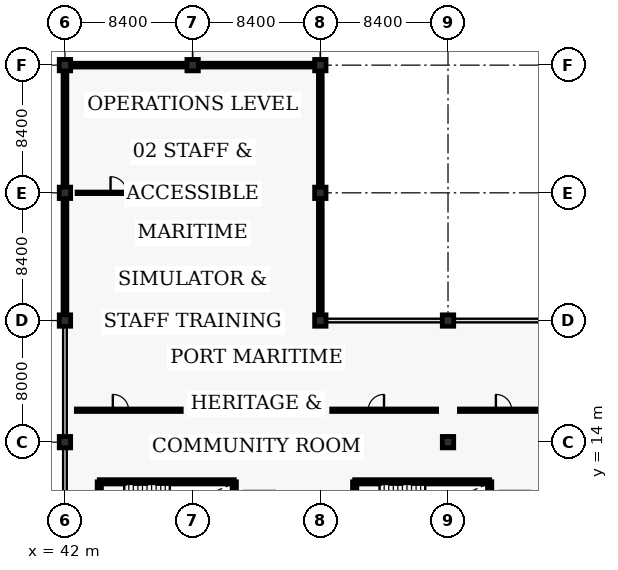
"""IFC4 building model, lengths in metres.
Left out: names, types, materials, properties, quantities, classifications, styles, units other than length and angle.
Written with IfcOpenShell. Run it as: python <this file> out.ifc"""

import sys

from ifc_helpers import new_model, si_unit, direction, frame, frame_2d, origin, origin_2d, place, context, subcontext, project, spatial, rectangle, extrude, element, fill, save


model = new_model("IFC4")
c1 = context("Model", 3, precision=1e-05, world=origin(), true_north=direction((0.0, 1.0)))
c2 = subcontext(c1, "Body", "Model", "MODEL_VIEW")
j1 = project(units=[si_unit("LENGTHUNIT", "METRE"), si_unit("PLANEANGLEUNIT", "RADIAN")], contexts=[c1])
p1 = place(None, origin())
s1 = spatial("IfcSite", under=j1, at=p1, CompositionType="ELEMENT")
p2 = place(p1, origin())
s2 = spatial("IfcBuilding", under=s1, at=p2, CompositionType="ELEMENT")
p3 = place(p2, frame((0.0, 0.0, 9.6)))
s3 = spatial("IfcBuildingStorey", under=s2, at=p3, CompositionType="ELEMENT", Elevation=9.6)
for number, where, z_axis, x_axis in (
    (1, (42.0, 14.0, 0.0), (0.0, 0.0, 1.0), (1.0, 0.0, 0.0)),
    (2, (42.0, 22.0, 0.0), (0.0, 0.0, 1.0), (1.0, 0.0, 0.0)),
    (3, (50.4, 14.0, 0.0), (0.0, 0.0, 1.0), (1.0, 0.0, 0.0)),
    (4, (50.4, 22.0, 0.0), (0.0, 0.0, 1.0), (1.0, 0.0, 0.0)),
    (5, (58.8, 14.0, 0.0), (0.0, 0.0, 1.0), (1.0, 0.0, 0.0)),
    (6, (58.8, 22.0, 0.0), (0.0, 0.0, 1.0), (1.0, 0.0, 0.0)),
    (7, (67.2, 14.0, 0.0), (0.0, 0.0, 1.0), (1.0, 0.0, 0.0)),
    (8, (67.2, 22.0, 0.0), (0.0, 0.0, 1.0), (1.0, 0.0, 0.0)),
    (9, (42.0, 30.4, 0.0), (0.0, 0.0, 1.0), (1.0, 0.0, 0.0)),
    (10, (42.0, 38.8, 0.0), (0.0, 0.0, 1.0), (1.0, 0.0, 0.0)),
    (11, (50.4, 30.4, 0.0), (0.0, 0.0, 1.0), (1.0, 0.0, 0.0)),
    (12, (50.4, 38.8, 0.0), (0.0, 0.0, 1.0), (1.0, 0.0, 0.0)),
    (13, (58.8, 30.4, 0.0), (0.0, 0.0, 1.0), (1.0, 0.0, 0.0)),
    (14, (58.8, 38.8, 0.0), (0.0, 0.0, 1.0), (1.0, 0.0, 0.0)),
):
    element("IfcColumn", number, at=place(p3, frame(where, z_axis=z_axis, x_axis=x_axis)), inside=s3, PredefinedType="COLUMN", context=c2, shape_type="SweptSolid", body=[
        extrude(rectangle(XDim=0.75, YDim=0.75, at=origin_2d()), origin(), (0.0, 0.0, 1.0), 3.52),
    ])
p4 = place(p3, frame((42.0, 30.025, 0.0), z_axis=(0.0, 0.0, 1.0), x_axis=(0.0, -1.0, 0.0)))
e15 = element("IfcWall", 15, at=p4, inside=s3, PredefinedType="SOLIDWALL", context=c2, shape_type="SweptSolid", body=[
    extrude(rectangle(XDim=7.65, YDim=0.25, at=frame_2d((3.825, 0.0))), origin(), (0.0, 0.0, 1.0), 2.805),
])
p5 = place(p4, frame((1.665, 0.0, 0.95)))
e16 = element("IfcOpeningElement", 16, at=p5, cuts=e15, PredefinedType="OPENING", context=c2, shape_type="SweptSolid", body=[
    extrude(rectangle(XDim=1.6, YDim=1.35, at=frame_2d((0.8, 0.675))), frame((0.0, 0.135, 0.0), z_axis=(0.0, -1.0, 0.0), x_axis=(1.0, 0.0, 0.0)), (0.0, 0.0, 1.0), 0.27),
])
p6 = place(p4, frame((4.365, 0.0, 0.95)))
e17 = element("IfcOpeningElement", 17, at=p6, cuts=e15, PredefinedType="OPENING", context=c2, shape_type="SweptSolid", body=[
    extrude(rectangle(XDim=1.3, YDim=1.35, at=frame_2d((0.65, 0.675))), frame((0.0, 0.135, 0.0), z_axis=(0.0, -1.0, 0.0), x_axis=(1.0, 0.0, 0.0)), (0.0, 0.0, 1.0), 0.27),
])
p7 = place(p3, frame((58.8, 22.375, 0.0), z_axis=(0.0, 0.0, 1.0), x_axis=(0.0, 1.0, 0.0)))
e18 = element("IfcWall", 18, at=p7, inside=s3, PredefinedType="SOLIDWALL", context=c2, shape_type="SweptSolid", body=[
    extrude(rectangle(XDim=7.65, YDim=0.25, at=frame_2d((3.825, 0.0))), origin(), (0.0, 0.0, 1.0), 2.805),
])
p8 = place(p7, frame((1.665, 0.0, 0.95)))
e19 = element("IfcOpeningElement", 19, at=p8, cuts=e18, PredefinedType="OPENING", context=c2, shape_type="SweptSolid", body=[
    extrude(rectangle(XDim=1.6, YDim=1.35, at=frame_2d((0.8, 0.675))), frame((0.0, 0.135, 0.0), z_axis=(0.0, -1.0, 0.0), x_axis=(1.0, 0.0, 0.0)), (0.0, 0.0, 1.0), 0.27),
])
p9 = place(p7, frame((4.365, 0.0, 0.95)))
e20 = element("IfcOpeningElement", 20, at=p9, cuts=e18, PredefinedType="OPENING", context=c2, shape_type="SweptSolid", body=[
    extrude(rectangle(XDim=1.3, YDim=1.35, at=frame_2d((0.65, 0.675))), frame((0.0, 0.135, 0.0), z_axis=(0.0, -1.0, 0.0), x_axis=(1.0, 0.0, 0.0)), (0.0, 0.0, 1.0), 0.27),
])
p10 = place(p3, frame((42.0, 38.425, 0.0), z_axis=(0.0, 0.0, 1.0), x_axis=(0.0, -1.0, 0.0)))
e21 = element("IfcWall", 21, at=p10, inside=s3, PredefinedType="SOLIDWALL", context=c2, shape_type="SweptSolid", body=[
    extrude(rectangle(XDim=7.65, YDim=0.25, at=frame_2d((3.825, 0.0))), origin(), (0.0, 0.0, 1.0), 2.805),
])
p11 = place(p10, frame((1.665, 0.0, 0.95)))
e22 = element("IfcOpeningElement", 22, at=p11, cuts=e21, PredefinedType="OPENING", context=c2, shape_type="SweptSolid", body=[
    extrude(rectangle(XDim=1.6, YDim=1.35, at=frame_2d((0.8, 0.675))), frame((0.0, 0.135, 0.0), z_axis=(0.0, -1.0, 0.0), x_axis=(1.0, 0.0, 0.0)), (0.0, 0.0, 1.0), 0.27),
])
p12 = place(p10, frame((4.365, 0.0, 0.95)))
e23 = element("IfcOpeningElement", 23, at=p12, cuts=e21, PredefinedType="OPENING", context=c2, shape_type="SweptSolid", body=[
    extrude(rectangle(XDim=1.3, YDim=1.35, at=frame_2d((0.65, 0.675))), frame((0.0, 0.135, 0.0), z_axis=(0.0, -1.0, 0.0), x_axis=(1.0, 0.0, 0.0)), (0.0, 0.0, 1.0), 0.27),
])
p13 = place(p3, frame((58.8, 30.775, 0.0), z_axis=(0.0, 0.0, 1.0), x_axis=(0.0, 1.0, 0.0)))
e24 = element("IfcWall", 24, at=p13, inside=s3, PredefinedType="SOLIDWALL", context=c2, shape_type="SweptSolid", body=[
    extrude(rectangle(XDim=7.65, YDim=0.25, at=frame_2d((3.825, 0.0))), origin(), (0.0, 0.0, 1.0), 2.805),
])
p14 = place(p13, frame((1.665, 0.0, 0.95)))
e25 = element("IfcOpeningElement", 25, at=p14, cuts=e24, PredefinedType="OPENING", context=c2, shape_type="SweptSolid", body=[
    extrude(rectangle(XDim=1.6, YDim=1.35, at=frame_2d((0.8, 0.675))), frame((0.0, 0.135, 0.0), z_axis=(0.0, -1.0, 0.0), x_axis=(1.0, 0.0, 0.0)), (0.0, 0.0, 1.0), 0.27),
])
p15 = place(p13, frame((4.365, 0.0, 0.95)))
e26 = element("IfcOpeningElement", 26, at=p15, cuts=e24, PredefinedType="OPENING", context=c2, shape_type="SweptSolid", body=[
    extrude(rectangle(XDim=1.3, YDim=1.35, at=frame_2d((0.65, 0.675))), frame((0.0, 0.135, 0.0), z_axis=(0.0, -1.0, 0.0), x_axis=(1.0, 0.0, 0.0)), (0.0, 0.0, 1.0), 0.27),
])
p16 = place(p3, frame((50.025, 38.8, 0.0), z_axis=(0.0, 0.0, 1.0), x_axis=(-1.0, 0.0, 0.0)))
e27 = element("IfcWall", 27, at=p16, inside=s3, PredefinedType="SOLIDWALL", context=c2, shape_type="SweptSolid", body=[
    extrude(rectangle(XDim=7.65, YDim=0.25, at=frame_2d((3.825, 0.0))), origin(), (0.0, 0.0, 1.0), 2.805),
])
p17 = place(p16, frame((1.515, 0.0, 0.95)))
e28 = element("IfcOpeningElement", 28, at=p17, cuts=e27, PredefinedType="OPENING", context=c2, shape_type="SweptSolid", body=[
    extrude(rectangle(XDim=2.4, YDim=1.5, at=frame_2d((1.2, 0.75))), frame((0.0, 0.135, 0.0), z_axis=(0.0, -1.0, 0.0), x_axis=(1.0, 0.0, 0.0)), (0.0, 0.0, 1.0), 0.27),
])
p18 = place(p16, frame((4.315, 0.0, 1.35)))
e29 = element("IfcOpeningElement", 29, at=p18, cuts=e27, PredefinedType="OPENING", context=c2, shape_type="SweptSolid", body=[
    extrude(rectangle(XDim=2.8, YDim=1.05, at=frame_2d((1.4, 0.525))), frame((0.0, 0.135, 0.0), z_axis=(0.0, -1.0, 0.0), x_axis=(1.0, 0.0, 0.0)), (0.0, 0.0, 1.0), 0.27),
])
p19 = place(p3, frame((58.425, 38.8, 0.0), z_axis=(0.0, 0.0, 1.0), x_axis=(-1.0, 0.0, 0.0)))
e30 = element("IfcWall", 30, at=p19, inside=s3, PredefinedType="SOLIDWALL", context=c2, shape_type="SweptSolid", body=[
    extrude(rectangle(XDim=7.65, YDim=0.25, at=frame_2d((3.825, 0.0))), origin(), (0.0, 0.0, 1.0), 2.805),
])
p20 = place(p19, frame((1.515, 0.0, 0.95)))
e31 = element("IfcOpeningElement", 31, at=p20, cuts=e30, PredefinedType="OPENING", context=c2, shape_type="SweptSolid", body=[
    extrude(rectangle(XDim=2.4, YDim=1.5, at=frame_2d((1.2, 0.75))), frame((0.0, 0.135, 0.0), z_axis=(0.0, -1.0, 0.0), x_axis=(1.0, 0.0, 0.0)), (0.0, 0.0, 1.0), 0.27),
])
p21 = place(p19, frame((4.315, 0.0, 1.35)))
e32 = element("IfcOpeningElement", 32, at=p21, cuts=e30, PredefinedType="OPENING", context=c2, shape_type="SweptSolid", body=[
    extrude(rectangle(XDim=2.8, YDim=1.05, at=frame_2d((1.4, 0.525))), frame((0.0, 0.135, 0.0), z_axis=(0.0, -1.0, 0.0), x_axis=(1.0, 0.0, 0.0)), (0.0, 0.0, 1.0), 0.27),
])
p22 = place(p3, frame((44.26, 11.39, 0.0), z_axis=(0.0, 0.0, 1.0), x_axis=(1.0, 0.0, 0.0)))
e33 = element("IfcWall", 33, at=p22, inside=s3, PredefinedType="SHEAR", context=c2, shape_type="SweptSolid", body=[
    extrude(rectangle(XDim=8.88, YDim=0.28, at=frame_2d((4.44, 0.0))), origin(), (0.0, 0.0, 1.0), 3.52),
])
p23 = place(p3, frame((44.26, 11.39, 0.0), z_axis=(0.0, 0.0, 1.0), x_axis=(0.0, -1.0, 0.0)))
e34 = element("IfcWall", 34, at=p23, inside=s3, PredefinedType="SHEAR", context=c2, shape_type="SweptSolid", body=[
    extrude(rectangle(XDim=3.43, YDim=0.28, at=frame_2d((1.715, 0.0))), origin(), (0.0, 0.0, 1.0), 3.52),
])
p24 = place(p23, frame((1.035, 0.0, 0.0)))
e35 = element("IfcOpeningElement", 35, at=p24, cuts=e34, PredefinedType="OPENING", context=c2, shape_type="SweptSolid", body=[
    extrude(rectangle(XDim=1.36, YDim=2.15, at=frame_2d((0.68, 1.075))), frame((0.0, 0.15, 0.0), z_axis=(0.0, -1.0, 0.0), x_axis=(1.0, 0.0, 0.0)), (0.0, 0.0, 1.0), 0.3),
])
p25 = place(p3, frame((53.14, 7.96, 0.0), z_axis=(0.0, 0.0, 1.0), x_axis=(0.0, 1.0, 0.0)))
e36 = element("IfcWall", 36, at=p25, inside=s3, PredefinedType="SHEAR", context=c2, shape_type="SweptSolid", body=[
    extrude(rectangle(XDim=3.43, YDim=0.28, at=frame_2d((1.715, 0.0))), origin(), (0.0, 0.0, 1.0), 3.52),
])
p26 = place(p3, frame((61.06, 11.39, 0.0), z_axis=(0.0, 0.0, 1.0), x_axis=(1.0, 0.0, 0.0)))
e37 = element("IfcWall", 37, at=p26, inside=s3, PredefinedType="SHEAR", context=c2, shape_type="SweptSolid", body=[
    extrude(rectangle(XDim=8.88, YDim=0.28, at=frame_2d((4.44, 0.0))), origin(), (0.0, 0.0, 1.0), 3.52),
])
p27 = place(p3, frame((61.06, 11.39, 0.0), z_axis=(0.0, 0.0, 1.0), x_axis=(0.0, -1.0, 0.0)))
e38 = element("IfcWall", 38, at=p27, inside=s3, PredefinedType="SHEAR", context=c2, shape_type="SweptSolid", body=[
    extrude(rectangle(XDim=3.43, YDim=0.28, at=frame_2d((1.715, 0.0))), origin(), (0.0, 0.0, 1.0), 3.52),
])
p28 = place(p27, frame((1.075, 0.0, 0.0)))
e39 = element("IfcOpeningElement", 39, at=p28, cuts=e38, PredefinedType="OPENING", context=c2, shape_type="SweptSolid", body=[
    extrude(rectangle(XDim=1.28, YDim=2.1, at=frame_2d((0.64, 1.05))), frame((0.0, 0.15, 0.0), z_axis=(0.0, -1.0, 0.0), x_axis=(1.0, 0.0, 0.0)), (0.0, 0.0, 1.0), 0.3),
])
p29 = place(p3, frame((69.94, 7.96, 0.0), z_axis=(0.0, 0.0, 1.0), x_axis=(0.0, 1.0, 0.0)))
e40 = element("IfcWall", 40, at=p29, inside=s3, PredefinedType="SHEAR", context=c2, shape_type="SweptSolid", body=[
    extrude(rectangle(XDim=3.43, YDim=0.28, at=frame_2d((1.715, 0.0))), origin(), (0.0, 0.0, 1.0), 3.52),
])
p30 = place(p3, frame((42.75, 16.1, 0.0), z_axis=(0.0, 0.0, 1.0), x_axis=(1.0, 0.0, 0.0)))
e41 = element("IfcWall", 41, at=p30, inside=s3, PredefinedType="PARTITIONING", context=c2, shape_type="SweptSolid", body=[
    extrude(rectangle(XDim=6.9, YDim=0.16, at=frame_2d((3.45, 0.0))), origin(), (0.0, 0.0, 1.0), 2.5),
])
p31 = place(p30, frame((2.4, 0.0, 0.0)))
e42 = element("IfcOpeningElement", 42, at=p31, cuts=e41, PredefinedType="OPENING", context=c2, shape_type="SweptSolid", body=[
    extrude(rectangle(XDim=1.04, YDim=2.14, at=frame_2d((0.52, 1.07))), frame((0.0, 0.09, 0.0), z_axis=(0.0, -1.0, 0.0), x_axis=(1.0, 0.0, 0.0)), (0.0, 0.0, 1.0), 0.18),
])
p32 = place(p3, frame((51.15, 16.1, 0.0), z_axis=(0.0, 0.0, 1.0), x_axis=(1.0, 0.0, 0.0)))
e43 = element("IfcWall", 43, at=p32, inside=s3, PredefinedType="PARTITIONING", context=c2, shape_type="SweptSolid", body=[
    extrude(rectangle(XDim=6.9, YDim=0.16, at=frame_2d((3.45, 0.0))), origin(), (0.0, 0.0, 1.0), 2.5),
])
p33 = place(p32, frame((2.4, 0.0, 0.0)))
e44 = element("IfcOpeningElement", 44, at=p33, cuts=e43, PredefinedType="OPENING", context=c2, shape_type="SweptSolid", body=[
    extrude(rectangle(XDim=1.04, YDim=2.14, at=frame_2d((0.52, 1.07))), frame((0.0, 0.09, 0.0), z_axis=(0.0, -1.0, 0.0), x_axis=(1.0, 0.0, 0.0)), (0.0, 0.0, 1.0), 0.18),
])
p34 = place(p3, frame((59.55, 16.1, 0.0), z_axis=(0.0, 0.0, 1.0), x_axis=(1.0, 0.0, 0.0)))
e45 = element("IfcWall", 45, at=p34, inside=s3, PredefinedType="PARTITIONING", context=c2, shape_type="SweptSolid", body=[
    extrude(rectangle(XDim=6.9, YDim=0.16, at=frame_2d((3.45, 0.0))), origin(), (0.0, 0.0, 1.0), 2.5),
])
p35 = place(p34, frame((2.4, 0.0, 0.0)))
e46 = element("IfcOpeningElement", 46, at=p35, cuts=e45, PredefinedType="OPENING", context=c2, shape_type="SweptSolid", body=[
    extrude(rectangle(XDim=1.04, YDim=2.14, at=frame_2d((0.52, 1.07))), frame((0.0, 0.09, 0.0), z_axis=(0.0, -1.0, 0.0), x_axis=(1.0, 0.0, 0.0)), (0.0, 0.0, 1.0), 0.18),
])
p36 = place(p3, frame((67.95, 16.1, 0.0), z_axis=(0.0, 0.0, 1.0), x_axis=(1.0, 0.0, 0.0)))
e47 = element("IfcWall", 47, at=p36, inside=s3, PredefinedType="PARTITIONING", context=c2, shape_type="SweptSolid", body=[
    extrude(rectangle(XDim=6.9, YDim=0.16, at=frame_2d((3.45, 0.0))), origin(), (0.0, 0.0, 1.0), 2.5),
])
p37 = place(p36, frame((2.4, 0.0, 0.0)))
e48 = element("IfcOpeningElement", 48, at=p37, cuts=e47, PredefinedType="OPENING", context=c2, shape_type="SweptSolid", body=[
    extrude(rectangle(XDim=1.04, YDim=2.14, at=frame_2d((0.52, 1.07))), frame((0.0, 0.09, 0.0), z_axis=(0.0, -1.0, 0.0), x_axis=(1.0, 0.0, 0.0)), (0.0, 0.0, 1.0), 0.18),
])
p38 = place(p3, frame((42.8, 30.4, 0.0), z_axis=(0.0, 0.0, 1.0), x_axis=(1.0, 0.0, 0.0)))
e49 = element("IfcWall", 49, at=p38, inside=s3, PredefinedType="PARTITIONING", context=c2, shape_type="SweptSolid", body=[
    extrude(rectangle(XDim=6.8, YDim=0.1, at=frame_2d((3.4, 0.0))), origin(), (0.0, 0.0, 1.0), 2.5),
])
p39 = place(p38, frame((2.2, 0.0, 0.0)))
e50 = element("IfcOpeningElement", 50, at=p39, cuts=e49, PredefinedType="OPENING", context=c2, shape_type="SweptSolid", body=[
    extrude(rectangle(XDim=1.06, YDim=2.1, at=frame_2d((0.53, 1.05))), frame((0.0, 0.06, 0.0), z_axis=(0.0, -1.0, 0.0), x_axis=(1.0, 0.0, 0.0)), (0.0, 0.0, 1.0), 0.12),
])
p40 = place(p5, origin())
e51 = element("IfcWindow", 51, at=p40, inside=s3, PartitioningType="DOUBLE_PANEL_VERTICAL", PredefinedType="WINDOW", context=c2, shape_type="SweptSolid", body=[
    extrude(rectangle(XDim=1.6, YDim=1.35, at=frame_2d((0.8, 0.675))), frame((0.0, 0.03, 0.0), z_axis=(0.0, -1.0, 0.0), x_axis=(1.0, 0.0, 0.0)), (0.0, 0.0, 1.0), 0.06),
])
fill(e16, e51)
p41 = place(p6, origin())
e52 = element("IfcWindow", 52, at=p41, inside=s3, PartitioningType="SINGLE_PANEL", PredefinedType="WINDOW", context=c2, shape_type="SweptSolid", body=[
    extrude(rectangle(XDim=1.3, YDim=1.35, at=frame_2d((0.65, 0.675))), frame((0.0, 0.03, 0.0), z_axis=(0.0, -1.0, 0.0), x_axis=(1.0, 0.0, 0.0)), (0.0, 0.0, 1.0), 0.06),
])
fill(e17, e52)
p42 = place(p8, origin())
e53 = element("IfcWindow", 53, at=p42, inside=s3, PartitioningType="DOUBLE_PANEL_VERTICAL", PredefinedType="WINDOW", context=c2, shape_type="SweptSolid", body=[
    extrude(rectangle(XDim=1.6, YDim=1.35, at=frame_2d((0.8, 0.675))), frame((0.0, 0.03, 0.0), z_axis=(0.0, -1.0, 0.0), x_axis=(1.0, 0.0, 0.0)), (0.0, 0.0, 1.0), 0.06),
])
fill(e19, e53)
p43 = place(p9, origin())
e54 = element("IfcWindow", 54, at=p43, inside=s3, PartitioningType="SINGLE_PANEL", PredefinedType="WINDOW", context=c2, shape_type="SweptSolid", body=[
    extrude(rectangle(XDim=1.3, YDim=1.35, at=frame_2d((0.65, 0.675))), frame((0.0, 0.03, 0.0), z_axis=(0.0, -1.0, 0.0), x_axis=(1.0, 0.0, 0.0)), (0.0, 0.0, 1.0), 0.06),
])
fill(e20, e54)
p44 = place(p11, origin())
e55 = element("IfcWindow", 55, at=p44, inside=s3, PartitioningType="DOUBLE_PANEL_VERTICAL", PredefinedType="WINDOW", context=c2, shape_type="SweptSolid", body=[
    extrude(rectangle(XDim=1.6, YDim=1.35, at=frame_2d((0.8, 0.675))), frame((0.0, 0.03, 0.0), z_axis=(0.0, -1.0, 0.0), x_axis=(1.0, 0.0, 0.0)), (0.0, 0.0, 1.0), 0.06),
])
fill(e22, e55)
p45 = place(p12, origin())
e56 = element("IfcWindow", 56, at=p45, inside=s3, PartitioningType="SINGLE_PANEL", PredefinedType="WINDOW", context=c2, shape_type="SweptSolid", body=[
    extrude(rectangle(XDim=1.3, YDim=1.35, at=frame_2d((0.65, 0.675))), frame((0.0, 0.03, 0.0), z_axis=(0.0, -1.0, 0.0), x_axis=(1.0, 0.0, 0.0)), (0.0, 0.0, 1.0), 0.06),
])
fill(e23, e56)
p46 = place(p14, origin())
e57 = element("IfcWindow", 57, at=p46, inside=s3, PartitioningType="DOUBLE_PANEL_VERTICAL", PredefinedType="WINDOW", context=c2, shape_type="SweptSolid", body=[
    extrude(rectangle(XDim=1.6, YDim=1.35, at=frame_2d((0.8, 0.675))), frame((0.0, 0.03, 0.0), z_axis=(0.0, -1.0, 0.0), x_axis=(1.0, 0.0, 0.0)), (0.0, 0.0, 1.0), 0.06),
])
fill(e25, e57)
p47 = place(p15, origin())
e58 = element("IfcWindow", 58, at=p47, inside=s3, PartitioningType="SINGLE_PANEL", PredefinedType="WINDOW", context=c2, shape_type="SweptSolid", body=[
    extrude(rectangle(XDim=1.3, YDim=1.35, at=frame_2d((0.65, 0.675))), frame((0.0, 0.03, 0.0), z_axis=(0.0, -1.0, 0.0), x_axis=(1.0, 0.0, 0.0)), (0.0, 0.0, 1.0), 0.06),
])
fill(e26, e58)
p48 = place(p17, origin())
e59 = element("IfcWindow", 59, at=p48, inside=s3, PartitioningType="TRIPLE_PANEL_VERTICAL", PredefinedType="WINDOW", context=c2, shape_type="SweptSolid", body=[
    extrude(rectangle(XDim=2.4, YDim=1.5, at=frame_2d((1.2, 0.75))), frame((0.0, 0.03, 0.0), z_axis=(0.0, -1.0, 0.0), x_axis=(1.0, 0.0, 0.0)), (0.0, 0.0, 1.0), 0.06),
])
fill(e28, e59)
p49 = place(p18, origin())
e60 = element("IfcWindow", 60, at=p49, inside=s3, PartitioningType="TRIPLE_PANEL_VERTICAL", PredefinedType="WINDOW", context=c2, shape_type="SweptSolid", body=[
    extrude(rectangle(XDim=2.8, YDim=1.05, at=frame_2d((1.4, 0.525))), frame((0.0, 0.03, 0.0), z_axis=(0.0, -1.0, 0.0), x_axis=(1.0, 0.0, 0.0)), (0.0, 0.0, 1.0), 0.06),
])
fill(e29, e60)
p50 = place(p20, origin())
e61 = element("IfcWindow", 61, at=p50, inside=s3, PartitioningType="TRIPLE_PANEL_VERTICAL", PredefinedType="WINDOW", context=c2, shape_type="SweptSolid", body=[
    extrude(rectangle(XDim=2.4, YDim=1.5, at=frame_2d((1.2, 0.75))), frame((0.0, 0.03, 0.0), z_axis=(0.0, -1.0, 0.0), x_axis=(1.0, 0.0, 0.0)), (0.0, 0.0, 1.0), 0.06),
])
fill(e31, e61)
p51 = place(p21, origin())
e62 = element("IfcWindow", 62, at=p51, inside=s3, PartitioningType="TRIPLE_PANEL_VERTICAL", PredefinedType="WINDOW", context=c2, shape_type="SweptSolid", body=[
    extrude(rectangle(XDim=2.8, YDim=1.05, at=frame_2d((1.4, 0.525))), frame((0.0, 0.03, 0.0), z_axis=(0.0, -1.0, 0.0), x_axis=(1.0, 0.0, 0.0)), (0.0, 0.0, 1.0), 0.06),
])
fill(e32, e62)
p52 = place(p31, origin())
e63 = element("IfcDoor", 63, at=p52, inside=s3, OperationType="SINGLE_SWING_LEFT", PredefinedType="DOOR", context=c2, shape_type="SweptSolid", body=[
    extrude(rectangle(XDim=1.04, YDim=2.14, at=frame_2d((0.52, 1.07))), frame((0.0, 0.025, 0.0), z_axis=(0.0, -1.0, 0.0), x_axis=(1.0, 0.0, 0.0)), (0.0, 0.0, 1.0), 0.05),
])
fill(e42, e63)
p53 = place(p33, origin())
e64 = element("IfcDoor", 64, at=p53, inside=s3, OperationType="SINGLE_SWING_RIGHT", PredefinedType="DOOR", context=c2, shape_type="SweptSolid", body=[
    extrude(rectangle(XDim=1.04, YDim=2.14, at=frame_2d((0.52, 1.07))), frame((0.0, 0.025, 0.0), z_axis=(0.0, -1.0, 0.0), x_axis=(1.0, 0.0, 0.0)), (0.0, 0.0, 1.0), 0.05),
])
fill(e44, e64)
p54 = place(p35, origin())
e65 = element("IfcDoor", 65, at=p54, inside=s3, OperationType="SINGLE_SWING_RIGHT", PredefinedType="DOOR", context=c2, shape_type="SweptSolid", body=[
    extrude(rectangle(XDim=1.04, YDim=2.14, at=frame_2d((0.52, 1.07))), frame((0.0, 0.025, 0.0), z_axis=(0.0, -1.0, 0.0), x_axis=(1.0, 0.0, 0.0)), (0.0, 0.0, 1.0), 0.05),
])
fill(e46, e65)
p55 = place(p37, origin())
e66 = element("IfcDoor", 66, at=p55, inside=s3, OperationType="SINGLE_SWING_LEFT", PredefinedType="DOOR", context=c2, shape_type="SweptSolid", body=[
    extrude(rectangle(XDim=1.04, YDim=2.14, at=frame_2d((0.52, 1.07))), frame((0.0, 0.025, 0.0), z_axis=(0.0, -1.0, 0.0), x_axis=(1.0, 0.0, 0.0)), (0.0, 0.0, 1.0), 0.05),
])
fill(e48, e66)
p56 = place(p39, origin())
e67 = element("IfcDoor", 67, at=p56, inside=s3, OperationType="SINGLE_SWING_LEFT", PredefinedType="DOOR", context=c2, shape_type="SweptSolid", body=[
    extrude(rectangle(XDim=1.06, YDim=2.1, at=frame_2d((0.53, 1.05))), frame((0.0, 0.025, 0.0), z_axis=(0.0, -1.0, 0.0), x_axis=(1.0, 0.0, 0.0)), (0.0, 0.0, 1.0), 0.05),
])
fill(e50, e67)
save(model, sys.argv[1])
